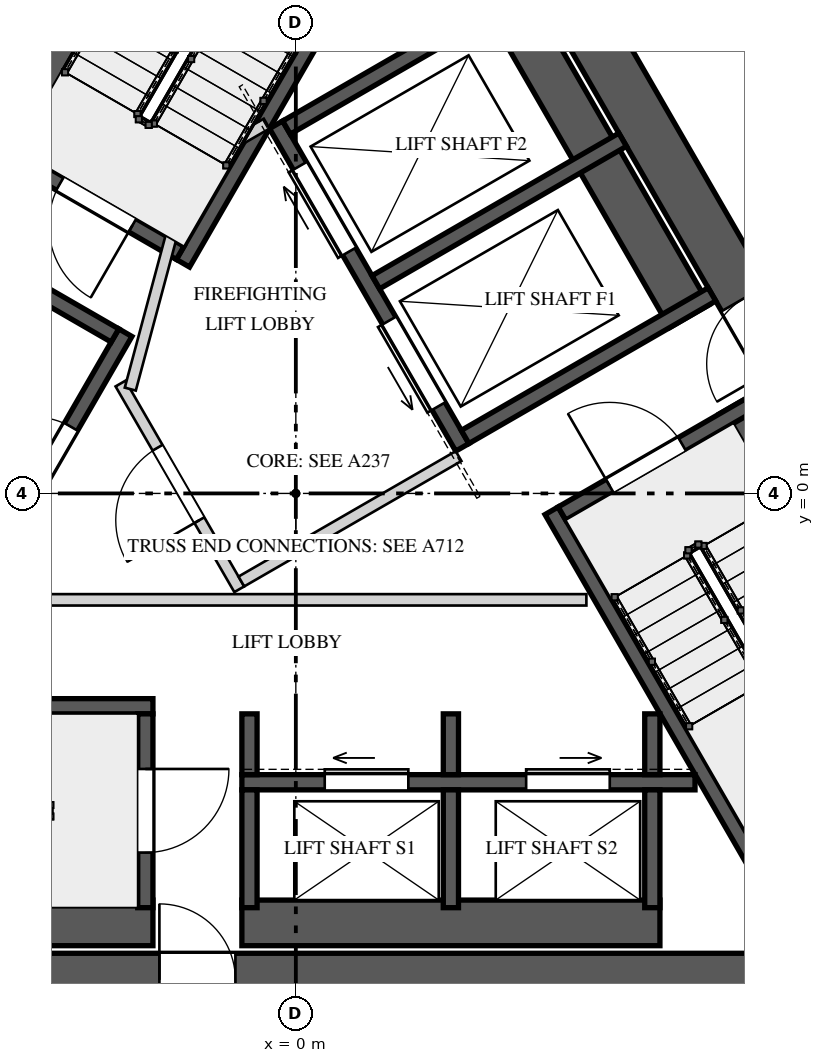
"""IFC4 building model, lengths in metres.
Left out: names, types, materials, properties, quantities, classifications, styles, units other than length and angle.
Written with IfcOpenShell. Run it as: python <this file> out.ifc"""

import sys

from ifc_helpers import new_model, si_unit, direction, frame, frame_2d, origin, place, context, subcontext, project, spatial, rectangle, extrude, element, fill, save


model = new_model("IFC4")
c1 = context("Model", 3, precision=1e-05, world=origin(), true_north=direction((0.0, 1.0)))
c2 = subcontext(c1, "Body", "Model", "MODEL_VIEW")
j1 = project(units=[si_unit("LENGTHUNIT", "METRE"), si_unit("PLANEANGLEUNIT", "RADIAN")], contexts=[c1])
p1 = place(None, origin())
s1 = spatial("IfcSite", under=j1, at=p1, CompositionType="ELEMENT")
p2 = place(p1, origin())
s2 = spatial("IfcBuilding", under=s1, at=p2, CompositionType="ELEMENT")
p3 = place(p2, frame((0.0, 0.0, 269.2)))
s3 = spatial("IfcBuildingStorey", under=s2, at=p3, CompositionType="ELEMENT", Elevation=269.2)
p4 = place(p3, frame((-1.241, 10.65, 0.0), z_axis=(0.0, 0.0, 1.0), x_axis=(-0.500003331888, -0.866023480109, 0.0)))
e1 = element("IfcWall", 1, at=p4, inside=s3, PredefinedType="SHEAR", context=c2, shape_type="SweptSolid", body=[
    extrude(rectangle(XDim=17.205, YDim=0.7, at=frame_2d((8.603, 0.0))), origin(), (0.0, 0.0, 1.0), 5.2),
])
p5 = place(p4, frame((6.808, 0.0, 0.0)))
e2 = element("IfcOpeningElement", 2, at=p5, cuts=e1, PredefinedType="OPENING", context=c2, shape_type="SweptSolid", body=[
    extrude(rectangle(XDim=1.0, YDim=2.4, at=frame_2d((0.5, 1.2))), frame((0.0, 0.36, 0.0), z_axis=(0.0, -1.0, 0.0), x_axis=(1.0, 0.0, 0.0)), (0.0, 0.0, 1.0), 0.72),
])
p6 = place(p3, frame((-8.603, -6.4, 0.0), z_axis=(0.0, 0.0, 1.0), x_axis=(1.0, 0.0, 0.0)))
e3 = element("IfcWall", 3, at=p6, inside=s3, PredefinedType="SHEAR", context=c2, shape_type="SweptSolid", body=[
    extrude(rectangle(XDim=17.205, YDim=0.7, at=frame_2d((8.603, 0.0))), origin(), (0.0, 0.0, 1.0), 5.2),
])
p7 = place(p6, frame((6.808, 0.0, 0.0)))
e4 = element("IfcOpeningElement", 4, at=p7, cuts=e3, PredefinedType="OPENING", context=c2, shape_type="SweptSolid", body=[
    extrude(rectangle(XDim=1.0, YDim=2.4, at=frame_2d((0.5, 1.2))), frame((0.0, 0.36, 0.0), z_axis=(0.0, -1.0, 0.0), x_axis=(1.0, 0.0, 0.0)), (0.0, 0.0, 1.0), 0.72),
])
p8 = place(p6, frame((14.922, 0.0, 0.0)))
e5 = element("IfcOpeningElement", 5, at=p8, cuts=e3, PredefinedType="OPENING", context=c2, shape_type="SweptSolid", body=[
    extrude(rectangle(XDim=0.8, YDim=2.1, at=frame_2d((0.4, 1.05))), frame((0.0, 0.36, 0.0), z_axis=(0.0, -1.0, 0.0), x_axis=(1.0, 0.0, 0.0)), (0.0, 0.0, 1.0), 0.72),
])
p9 = place(p3, frame((9.844, -4.25, 0.0), z_axis=(0.0, 0.0, 1.0), x_axis=(-0.500003331888, 0.866023480109, 0.0)))
e6 = element("IfcWall", 6, at=p9, inside=s3, PredefinedType="SHEAR", context=c2, shape_type="SweptSolid", body=[
    extrude(rectangle(XDim=17.205, YDim=0.7, at=frame_2d((8.603, 0.0))), origin(), (0.0, 0.0, 1.0), 5.2),
])
p10 = place(p9, frame((6.877, 0.0, 0.0)))
e7 = element("IfcOpeningElement", 7, at=p10, cuts=e6, PredefinedType="OPENING", context=c2, shape_type="SweptSolid", body=[
    extrude(rectangle(XDim=1.0, YDim=2.4, at=frame_2d((0.5, 1.2))), frame((0.0, 0.36, 0.0), z_axis=(0.0, -1.0, 0.0), x_axis=(1.0, 0.0, 0.0)), (0.0, 0.0, 1.0), 0.72),
])
p11 = place(p9, frame((14.445, 0.0, 0.0)))
e8 = element("IfcOpeningElement", 8, at=p11, cuts=e6, PredefinedType="OPENING", context=c2, shape_type="SweptSolid", body=[
    extrude(rectangle(XDim=0.8, YDim=2.1, at=frame_2d((0.4, 1.05))), frame((0.0, 0.36, 0.0), z_axis=(0.0, -1.0, 0.0), x_axis=(1.0, 0.0, 0.0)), (0.0, 0.0, 1.0), 0.72),
])
p12 = place(p3, frame((-0.853, 9.823, 0.0), z_axis=(0.0, 0.0, 1.0), x_axis=(-0.500009909098, -0.866019682689, 0.0)))
e9 = element("IfcWall", 9, at=p12, inside=s3, PredefinedType="SOLIDWALL", context=c2, shape_type="SweptSolid", body=[
    extrude(rectangle(XDim=6.2, YDim=0.6, at=frame_2d((3.1, 0.0))), origin(), (0.0, 0.0, 1.0), 4.85),
])
p13 = place(p3, frame((1.876, 8.85, 0.0), z_axis=(0.0, 0.0, 1.0), x_axis=(-0.499998042495, -0.866026533947, 0.0)))
e10 = element("IfcWall", 10, at=p13, inside=s3, PredefinedType="SOLIDWALL", context=c2, shape_type="SweptSolid", body=[
    extrude(rectangle(XDim=6.723, YDim=0.2, at=frame_2d((3.361, 0.0))), origin(), (0.0, 0.0, 1.0), 4.85),
])
p14 = place(p3, frame((-1.521, 3.165, 0.0), z_axis=(0.0, 0.0, 1.0), x_axis=(-0.866035871367, 0.499981869177, 0.0)))
e11 = element("IfcWall", 11, at=p14, inside=s3, PredefinedType="SOLIDWALL", context=c2, shape_type="SweptSolid", body=[
    extrude(rectangle(XDim=3.15, YDim=0.2, at=frame_2d((1.575, 0.0))), origin(), (0.0, 0.0, 1.0), 4.85),
])
p15 = place(p14, frame((0.725, 0.0, 0.0)))
e12 = element("IfcOpeningElement", 12, at=p15, cuts=e11, PredefinedType="OPENING", context=c2, shape_type="SweptSolid", body=[
    extrude(rectangle(XDim=1.1, YDim=2.4, at=frame_2d((0.55, 1.2))), frame((0.0, 0.11, 0.0), z_axis=(0.0, -1.0, 0.0), x_axis=(1.0, 0.0, 0.0)), (0.0, 0.0, 1.0), 0.22),
])
p16 = place(p3, frame((-8.08, -5.65, 0.0), z_axis=(0.0, 0.0, 1.0), x_axis=(1.0, 0.0, 0.0)))
e13 = element("IfcWall", 13, at=p16, inside=s3, PredefinedType="SOLIDWALL", context=c2, shape_type="SweptSolid", body=[
    extrude(rectangle(XDim=6.2, YDim=0.6, at=frame_2d((3.1, 0.0))), origin(), (0.0, 0.0, 1.0), 4.85),
])
p17 = place(p3, frame((-8.603, -2.8, 0.0), z_axis=(0.0, 0.0, 1.0), x_axis=(1.0, 0.0, 0.0)))
e14 = element("IfcWall", 14, at=p17, inside=s3, PredefinedType="SOLIDWALL", context=c2, shape_type="SweptSolid", body=[
    extrude(rectangle(XDim=6.723, YDim=0.2, at=frame_2d((3.361, 0.0))), origin(), (0.0, 0.0, 1.0), 4.85),
])
p18 = place(p3, frame((-1.98, -2.9, 0.0), z_axis=(0.0, 0.0, 1.0), x_axis=(0.0, -1.0, 0.0)))
e15 = element("IfcWall", 15, at=p18, inside=s3, PredefinedType="SOLIDWALL", context=c2, shape_type="SweptSolid", body=[
    extrude(rectangle(XDim=2.55, YDim=0.2, at=frame_2d((1.275, 0.0))), origin(), (0.0, 0.0, 1.0), 4.85),
])
p19 = place(p18, frame((0.725, 0.0, 0.0)))
e16 = element("IfcOpeningElement", 16, at=p19, cuts=e15, PredefinedType="OPENING", context=c2, shape_type="SweptSolid", body=[
    extrude(rectangle(XDim=1.1, YDim=2.4, at=frame_2d((0.55, 1.2))), frame((0.0, 0.11, 0.0), z_axis=(0.0, -1.0, 0.0), x_axis=(1.0, 0.0, 0.0)), (0.0, 0.0, 1.0), 0.22),
])
p20 = place(p3, frame((8.933, -4.172, 0.0), z_axis=(0.0, 0.0, 1.0), x_axis=(-0.500026960575, 0.86600983753, 0.0)))
e17 = element("IfcWall", 17, at=p20, inside=s3, PredefinedType="SOLIDWALL", context=c2, shape_type="SweptSolid", body=[
    extrude(rectangle(XDim=6.2, YDim=0.6, at=frame_2d((3.1, 0.0))), origin(), (0.0, 0.0, 1.0), 4.85),
])
p21 = place(p3, frame((6.726, -6.05, 0.0), z_axis=(0.0, 0.0, 1.0), x_axis=(-0.499970804718, 0.866042259032, 0.0)))
e18 = element("IfcWall", 18, at=p21, inside=s3, PredefinedType="SOLIDWALL", context=c2, shape_type="SweptSolid", body=[
    extrude(rectangle(XDim=6.723, YDim=0.2, at=frame_2d((3.361, 0.0))), origin(), (0.0, 0.0, 1.0), 4.85),
])
p22 = place(p3, frame((3.501, -0.265, 0.0), z_axis=(0.0, 0.0, 1.0), x_axis=(0.866035871367, 0.499981869177, 0.0)))
e19 = element("IfcWall", 19, at=p22, inside=s3, PredefinedType="SOLIDWALL", context=c2, shape_type="SweptSolid", body=[
    extrude(rectangle(XDim=3.15, YDim=0.2, at=frame_2d((1.575, 0.0))), origin(), (0.0, 0.0, 1.0), 4.85),
])
p23 = place(p22, frame((0.725, 0.0, 0.0)))
e20 = element("IfcOpeningElement", 20, at=p23, cuts=e19, PredefinedType="OPENING", context=c2, shape_type="SweptSolid", body=[
    extrude(rectangle(XDim=1.1, YDim=2.4, at=frame_2d((0.55, 1.2))), frame((0.0, 0.11, 0.0), z_axis=(0.0, -1.0, 0.0), x_axis=(1.0, 0.0, 0.0)), (0.0, 0.0, 1.0), 0.22),
])
p24 = place(p3, frame((-4.993, -2.648, 0.0), z_axis=(0.0, 0.0, 1.0), x_axis=(0.499996545922, 0.866027397988, 0.0)))
e21 = element("IfcWall", 21, at=p24, inside=s3, PredefinedType="SOLIDWALL", context=c2, shape_type="SweptSolid", body=[
    extrude(rectangle(XDim=5.5, YDim=0.2, at=frame_2d((2.75, 0.0))), origin(), (0.0, 0.0, 1.0), 4.85),
])
p25 = place(p24, frame((3.12, 0.0, 0.0)))
e22 = element("IfcOpeningElement", 22, at=p25, cuts=e21, PredefinedType="OPENING", context=c2, shape_type="SweptSolid", body=[
    extrude(rectangle(XDim=0.95, YDim=2.4, at=frame_2d((0.475, 1.2))), frame((0.0, 0.11, 0.0), z_axis=(0.0, -1.0, 0.0), x_axis=(1.0, 0.0, 0.0)), (0.0, 0.0, 1.0), 0.22),
])
p26 = place(p24, frame((0.605, 0.0, 0.0)))
e23 = element("IfcOpeningElement", 23, at=p26, cuts=e21, PredefinedType="OPENING", context=c2, shape_type="SweptSolid", body=[
    extrude(rectangle(XDim=0.8, YDim=2.1, at=frame_2d((0.4, 1.05))), frame((0.0, 0.11, 0.0), z_axis=(0.0, -1.0, 0.0), x_axis=(1.0, 0.0, 0.0)), (0.0, 0.0, 1.0), 0.22),
])
p27 = place(p3, frame((-2.38, 2.078, 0.0), z_axis=(0.0, 0.0, 1.0), x_axis=(-0.866060182126, 0.499939757307, 0.0)))
e24 = element("IfcWall", 24, at=p27, inside=s3, PredefinedType="SOLIDWALL", context=c2, shape_type="SweptSolid", body=[
    extrude(rectangle(XDim=2.95, YDim=0.2, at=frame_2d((1.475, 0.0))), origin(), (0.0, 0.0, 1.0), 4.85),
])
p28 = place(p3, frame((-0.71, -3.8, 0.0), z_axis=(0.0, 0.0, 1.0), x_axis=(1.0, 0.0, 0.0)))
e25 = element("IfcWall", 25, at=p28, inside=s3, PredefinedType="SOLIDWALL", context=c2, shape_type="SweptSolid", body=[
    extrude(rectangle(XDim=5.961, YDim=0.2, at=frame_2d((2.981, 0.0))), origin(), (0.0, 0.0, 1.0), 4.85),
])
p29 = place(p28, frame((1.09, 0.0, 0.0)))
e26 = element("IfcOpeningElement", 26, at=p29, cuts=e25, PredefinedType="OPENING", context=c2, shape_type="SweptSolid", body=[
    extrude(rectangle(XDim=1.1, YDim=2.1, at=frame_2d((0.55, 1.05))), frame((0.0, 0.11, 0.0), z_axis=(0.0, -1.0, 0.0), x_axis=(1.0, 0.0, 0.0)), (0.0, 0.0, 1.0), 0.22),
])
p30 = place(p28, frame((3.74, 0.0, 0.0)))
e27 = element("IfcOpeningElement", 27, at=p30, cuts=e25, PredefinedType="OPENING", context=c2, shape_type="SweptSolid", body=[
    extrude(rectangle(XDim=1.1, YDim=2.1, at=frame_2d((0.55, 1.05))), frame((0.0, 0.11, 0.0), z_axis=(0.0, -1.0, 0.0), x_axis=(1.0, 0.0, 0.0)), (0.0, 0.0, 1.0), 0.22),
])
p31 = place(p3, frame((-0.71, -5.65, 0.0), z_axis=(0.0, 0.0, 1.0), x_axis=(1.0, 0.0, 0.0)))
e28 = element("IfcWall", 28, at=p31, inside=s3, PredefinedType="SOLIDWALL", context=c2, shape_type="SweptSolid", body=[
    extrude(rectangle(XDim=5.5, YDim=0.6, at=frame_2d((2.75, 0.0))), origin(), (0.0, 0.0, 1.0), 4.85),
])
p32 = place(p3, frame((-0.61, -3.9, 0.0), z_axis=(0.0, 0.0, 1.0), x_axis=(0.0, -1.0, 0.0)))
e29 = element("IfcWall", 29, at=p32, inside=s3, PredefinedType="SOLIDWALL", context=c2, shape_type="SweptSolid", body=[
    extrude(rectangle(XDim=1.55, YDim=0.2, at=frame_2d((0.775, 0.0))), origin(), (0.0, 0.0, 1.0), 4.85),
])
p33 = place(p3, frame((-0.61, -2.9, 0.0), z_axis=(0.0, 0.0, 1.0), x_axis=(0.0, -1.0, 0.0)))
e30 = element("IfcWall", 30, at=p33, inside=s3, PredefinedType="SOLIDWALL", context=c2, shape_type="SweptSolid", body=[
    extrude(rectangle(XDim=0.8, YDim=0.2, at=frame_2d((0.4, 0.0))), origin(), (0.0, 0.0, 1.0), 4.85),
])
p34 = place(p3, frame((2.04, -3.9, 0.0), z_axis=(0.0, 0.0, 1.0), x_axis=(0.0, -1.0, 0.0)))
e31 = element("IfcWall", 31, at=p34, inside=s3, PredefinedType="SOLIDWALL", context=c2, shape_type="SweptSolid", body=[
    extrude(rectangle(XDim=1.55, YDim=0.2, at=frame_2d((0.775, 0.0))), origin(), (0.0, 0.0, 1.0), 4.85),
])
p35 = place(p3, frame((2.04, -2.9, 0.0), z_axis=(0.0, 0.0, 1.0), x_axis=(0.0, -1.0, 0.0)))
e32 = element("IfcWall", 32, at=p35, inside=s3, PredefinedType="SOLIDWALL", context=c2, shape_type="SweptSolid", body=[
    extrude(rectangle(XDim=0.8, YDim=0.2, at=frame_2d((0.4, 0.0))), origin(), (0.0, 0.0, 1.0), 4.85),
])
p36 = place(p3, frame((4.69, -3.9, 0.0), z_axis=(0.0, 0.0, 1.0), x_axis=(0.0, -1.0, 0.0)))
e33 = element("IfcWall", 33, at=p36, inside=s3, PredefinedType="SOLIDWALL", context=c2, shape_type="SweptSolid", body=[
    extrude(rectangle(XDim=1.55, YDim=0.2, at=frame_2d((0.775, 0.0))), origin(), (0.0, 0.0, 1.0), 4.85),
])
p37 = place(p3, frame((4.69, -2.9, 0.0), z_axis=(0.0, 0.0, 1.0), x_axis=(0.0, -1.0, 0.0)))
e34 = element("IfcWall", 34, at=p37, inside=s3, PredefinedType="SOLIDWALL", context=c2, shape_type="SweptSolid", body=[
    extrude(rectangle(XDim=0.8, YDim=0.2, at=frame_2d((0.4, 0.0))), origin(), (0.0, 0.0, 1.0), 4.85),
])
p38 = place(p3, frame((2.19, 0.606, 0.0), z_axis=(0.0, 0.0, 1.0), x_axis=(-0.500002801628, 0.866023786258, 0.0)))
e35 = element("IfcWall", 35, at=p38, inside=s3, PredefinedType="SOLIDWALL", context=c2, shape_type="SweptSolid", body=[
    extrude(rectangle(XDim=4.9, YDim=0.2, at=frame_2d((2.45, 0.0))), origin(), (0.0, 0.0, 1.0), 4.85),
])
p39 = place(p38, frame((0.625, 0.0, 0.0)))
e36 = element("IfcOpeningElement", 36, at=p39, cuts=e35, PredefinedType="OPENING", context=c2, shape_type="SweptSolid", body=[
    extrude(rectangle(XDim=1.3, YDim=2.1, at=frame_2d((0.65, 1.05))), frame((0.0, 0.11, 0.0), z_axis=(0.0, -1.0, 0.0), x_axis=(1.0, 0.0, 0.0)), (0.0, 0.0, 1.0), 0.22),
])
p40 = place(p38, frame((2.975, 0.0, 0.0)))
e37 = element("IfcOpeningElement", 37, at=p40, cuts=e35, PredefinedType="OPENING", context=c2, shape_type="SweptSolid", body=[
    extrude(rectangle(XDim=1.3, YDim=2.1, at=frame_2d((0.65, 1.05))), frame((0.0, 0.11, 0.0), z_axis=(0.0, -1.0, 0.0), x_axis=(1.0, 0.0, 0.0)), (0.0, 0.0, 1.0), 0.22),
])
p41 = place(p3, frame((5.178, 2.331, 0.0), z_axis=(0.0, 0.0, 1.0), x_axis=(-0.49998122708, 0.866036242063, 0.0)))
e38 = element("IfcWall", 38, at=p41, inside=s3, PredefinedType="SOLIDWALL", context=c2, shape_type="SweptSolid", body=[
    extrude(rectangle(XDim=4.9, YDim=0.6, at=frame_2d((2.45, 0.0))), origin(), (0.0, 0.0, 1.0), 4.85),
])
p42 = place(p3, frame((2.227, 0.743, 0.0), z_axis=(0.0, 0.0, 1.0), x_axis=(0.866022959057, 0.500004234368, 0.0)))
e39 = element("IfcWall", 39, at=p42, inside=s3, PredefinedType="SOLIDWALL", context=c2, shape_type="SweptSolid", body=[
    extrude(rectangle(XDim=3.75, YDim=0.2, at=frame_2d((1.875, 0.0))), origin(), (0.0, 0.0, 1.0), 4.85),
])
p43 = place(p3, frame((1.052, 2.778, 0.0), z_axis=(0.0, 0.0, 1.0), x_axis=(0.866039234136, 0.499976044363, 0.0)))
e40 = element("IfcWall", 40, at=p43, inside=s3, PredefinedType="SOLIDWALL", context=c2, shape_type="SweptSolid", body=[
    extrude(rectangle(XDim=3.75, YDim=0.2, at=frame_2d((1.875, 0.0))), origin(), (0.0, 0.0, 1.0), 4.85),
])
p44 = place(p3, frame((-0.123, 4.813, 0.0), z_axis=(0.0, 0.0, 1.0), x_axis=(0.866022959057, 0.500004234368, 0.0)))
e41 = element("IfcWall", 41, at=p44, inside=s3, PredefinedType="SOLIDWALL", context=c2, shape_type="SweptSolid", body=[
    extrude(rectangle(XDim=3.75, YDim=0.2, at=frame_2d((1.875, 0.0))), origin(), (0.0, 0.0, 1.0), 4.85),
])
p45 = place(p3, frame((-0.744, -1.261, 0.0), z_axis=(0.0, 0.0, 1.0), x_axis=(-0.500004234368, 0.866022959057, 0.0)))
e42 = element("IfcWall", 42, at=p45, inside=s3, PredefinedType="PARTITIONING", context=c2, shape_type="SweptSolid", body=[
    extrude(rectangle(XDim=3.125, YDim=0.15, at=frame_2d((1.562, 0.0))), origin(), (0.0, 0.0, 1.0), 4.85),
])
p46 = place(p45, frame((1.05, 0.0, 0.0)))
e43 = element("IfcOpeningElement", 43, at=p46, cuts=e42, PredefinedType="OPENING", context=c2, shape_type="SweptSolid", body=[
    extrude(rectangle(XDim=1.1, YDim=2.4, at=frame_2d((0.55, 1.2))), frame((0.0, 0.085, 0.0), z_axis=(0.0, -1.0, 0.0), x_axis=(1.0, 0.0, 0.0)), (0.0, 0.0, 1.0), 0.17),
])
p47 = place(p3, frame((-0.717, -1.159, 0.0), z_axis=(0.0, 0.0, 1.0), x_axis=(0.866008176907, 0.50002983664, 0.0)))
e44 = element("IfcWall", 44, at=p47, inside=s3, PredefinedType="PARTITIONING", context=c2, shape_type="SweptSolid", body=[
    extrude(rectangle(XDim=3.3, YDim=0.15, at=frame_2d((1.65, 0.0))), origin(), (0.0, 0.0, 1.0), 4.85),
])
p48 = place(p3, frame((-2.178, 1.372, 0.0), z_axis=(0.0, 0.0, 1.0), x_axis=(0.258808958833, 0.96592852884, 0.0)))
e45 = element("IfcWall", 45, at=p48, inside=s3, PredefinedType="PARTITIONING", context=c2, shape_type="SweptSolid", body=[
    extrude(rectangle(XDim=2.903, YDim=0.15, at=frame_2d((1.451, 0.0))), origin(), (0.0, 0.0, 1.0), 4.85),
])
p49 = place(p3, frame((-1.51, 4.215, 0.0), z_axis=(0.0, 0.0, 1.0), x_axis=(0.866085525409, 0.49989585183, 0.0)))
e46 = element("IfcWall", 46, at=p49, inside=s3, PredefinedType="PARTITIONING", context=c2, shape_type="SweptSolid", body=[
    extrude(rectangle(XDim=1.3, YDim=0.15, at=frame_2d((0.65, 0.0))), origin(), (0.0, 0.0, 1.0), 4.85),
])
p50 = place(p3, frame((-4.053, -1.4, 0.0), z_axis=(0.0, 0.0, 1.0), x_axis=(1.0, 0.0, 0.0)))
e47 = element("IfcWall", 47, at=p50, inside=s3, PredefinedType="PARTITIONING", context=c2, shape_type="SweptSolid", body=[
    extrude(rectangle(XDim=7.876, YDim=0.15, at=frame_2d((3.938, 0.0))), origin(), (0.0, 0.0, 1.0), 4.85),
])
p51 = place(p3, frame((5.868, 6.937, 0.0), z_axis=(0.0, 0.0, 1.0), x_axis=(0.499973847261, -0.866040502549, 0.0)))
e48 = element("IfcWall", 48, at=p51, inside=s3, PredefinedType="SOLIDWALL", context=c2, shape_type="SweptSolid", body=[
    extrude(rectangle(XDim=5.156, YDim=0.2, at=frame_2d((2.578, 0.0))), origin(), (0.0, 0.0, 1.0), 4.85),
])
p52 = place(p51, frame((1.052, 0.0, 0.0)))
e49 = element("IfcOpeningElement", 49, at=p52, cuts=e48, PredefinedType="OPENING", context=c2, shape_type="SweptSolid", body=[
    extrude(rectangle(XDim=1.1, YDim=2.2, at=frame_2d((0.55, 1.1))), frame((0.0, 0.11, 0.0), z_axis=(0.0, -1.0, 0.0), x_axis=(1.0, 0.0, 0.0)), (0.0, 0.0, 1.0), 0.22),
])
p53 = place(p15, origin())
e50 = element("IfcDoor", 50, at=p53, inside=s3, OperationType="SINGLE_SWING_RIGHT", PredefinedType="DOOR", context=c2, shape_type="SweptSolid", body=[
    extrude(rectangle(XDim=1.1, YDim=2.4, at=frame_2d((0.55, 1.2))), frame((0.0, 0.025, 0.0), z_axis=(0.0, -1.0, 0.0), x_axis=(1.0, 0.0, 0.0)), (0.0, 0.0, 1.0), 0.05),
])
fill(e12, e50)
p54 = place(p19, origin())
e51 = element("IfcDoor", 51, at=p54, inside=s3, OperationType="SINGLE_SWING_LEFT", PredefinedType="DOOR", context=c2, shape_type="SweptSolid", body=[
    extrude(rectangle(XDim=1.1, YDim=2.4, at=frame_2d((0.55, 1.2))), frame((0.0, 0.025, 0.0), z_axis=(0.0, -1.0, 0.0), x_axis=(1.0, 0.0, 0.0)), (0.0, 0.0, 1.0), 0.05),
])
fill(e16, e51)
p55 = place(p23, origin())
e52 = element("IfcDoor", 52, at=p55, inside=s3, OperationType="SINGLE_SWING_RIGHT", PredefinedType="DOOR", context=c2, shape_type="SweptSolid", body=[
    extrude(rectangle(XDim=1.1, YDim=2.4, at=frame_2d((0.55, 1.2))), frame((0.0, 0.025, 0.0), z_axis=(0.0, -1.0, 0.0), x_axis=(1.0, 0.0, 0.0)), (0.0, 0.0, 1.0), 0.05),
])
fill(e20, e52)
p56 = place(p25, origin())
e53 = element("IfcDoor", 53, at=p56, inside=s3, OperationType="SINGLE_SWING_LEFT", PredefinedType="DOOR", context=c2, shape_type="SweptSolid", body=[
    extrude(rectangle(XDim=0.95, YDim=2.4, at=frame_2d((0.475, 1.2))), frame((0.0, 0.025, 0.0), z_axis=(0.0, -1.0, 0.0), x_axis=(1.0, 0.0, 0.0)), (0.0, 0.0, 1.0), 0.05),
])
fill(e22, e53)
p57 = place(p29, origin())
e54 = element("IfcDoor", 54, at=p57, inside=s3, OperationType="SLIDING_TO_LEFT", PredefinedType="DOOR", context=c2, shape_type="SweptSolid", body=[
    extrude(rectangle(XDim=1.1, YDim=2.1, at=frame_2d((0.55, 1.05))), frame((0.0, 0.025, 0.0), z_axis=(0.0, -1.0, 0.0), x_axis=(1.0, 0.0, 0.0)), (0.0, 0.0, 1.0), 0.05),
])
fill(e26, e54)
p58 = place(p30, origin())
e55 = element("IfcDoor", 55, at=p58, inside=s3, OperationType="SLIDING_TO_RIGHT", PredefinedType="DOOR", context=c2, shape_type="SweptSolid", body=[
    extrude(rectangle(XDim=1.1, YDim=2.1, at=frame_2d((0.55, 1.05))), frame((0.0, 0.025, 0.0), z_axis=(0.0, -1.0, 0.0), x_axis=(1.0, 0.0, 0.0)), (0.0, 0.0, 1.0), 0.05),
])
fill(e27, e55)
p59 = place(p39, origin())
e56 = element("IfcDoor", 56, at=p59, inside=s3, OperationType="SLIDING_TO_LEFT", PredefinedType="DOOR", context=c2, shape_type="SweptSolid", body=[
    extrude(rectangle(XDim=1.3, YDim=2.1, at=frame_2d((0.65, 1.05))), frame((0.0, 0.025, 0.0), z_axis=(0.0, -1.0, 0.0), x_axis=(1.0, 0.0, 0.0)), (0.0, 0.0, 1.0), 0.05),
])
fill(e36, e56)
p60 = place(p40, origin())
e57 = element("IfcDoor", 57, at=p60, inside=s3, OperationType="SLIDING_TO_RIGHT", PredefinedType="DOOR", context=c2, shape_type="SweptSolid", body=[
    extrude(rectangle(XDim=1.3, YDim=2.1, at=frame_2d((0.65, 1.05))), frame((0.0, 0.025, 0.0), z_axis=(0.0, -1.0, 0.0), x_axis=(1.0, 0.0, 0.0)), (0.0, 0.0, 1.0), 0.05),
])
fill(e37, e57)
p61 = place(p46, origin())
e58 = element("IfcDoor", 58, at=p61, inside=s3, OperationType="SINGLE_SWING_LEFT", PredefinedType="DOOR", context=c2, shape_type="SweptSolid", body=[
    extrude(rectangle(XDim=1.1, YDim=2.4, at=frame_2d((0.55, 1.2))), frame((0.0, 0.025, 0.0), z_axis=(0.0, -1.0, 0.0), x_axis=(1.0, 0.0, 0.0)), (0.0, 0.0, 1.0), 0.05),
])
fill(e43, e58)
p62 = place(p7, origin())
e59 = element("IfcDoor", 59, at=p62, inside=s3, OperationType="SINGLE_SWING_LEFT", PredefinedType="DOOR", context=c2, shape_type="SweptSolid", body=[
    extrude(rectangle(XDim=1.0, YDim=2.4, at=frame_2d((0.5, 1.2))), frame((0.0, 0.025, 0.0), z_axis=(0.0, -1.0, 0.0), x_axis=(1.0, 0.0, 0.0)), (0.0, 0.0, 1.0), 0.05),
])
fill(e4, e59)
p63 = place(p10, origin())
e60 = element("IfcDoor", 60, at=p63, inside=s3, OperationType="SINGLE_SWING_RIGHT", PredefinedType="DOOR", context=c2, shape_type="SweptSolid", body=[
    extrude(rectangle(XDim=1.0, YDim=2.4, at=frame_2d((0.5, 1.2))), frame((0.0, 0.025, 0.0), z_axis=(0.0, -1.0, 0.0), x_axis=(1.0, 0.0, 0.0)), (0.0, 0.0, 1.0), 0.05),
])
fill(e7, e60)
save(model, sys.argv[1])
